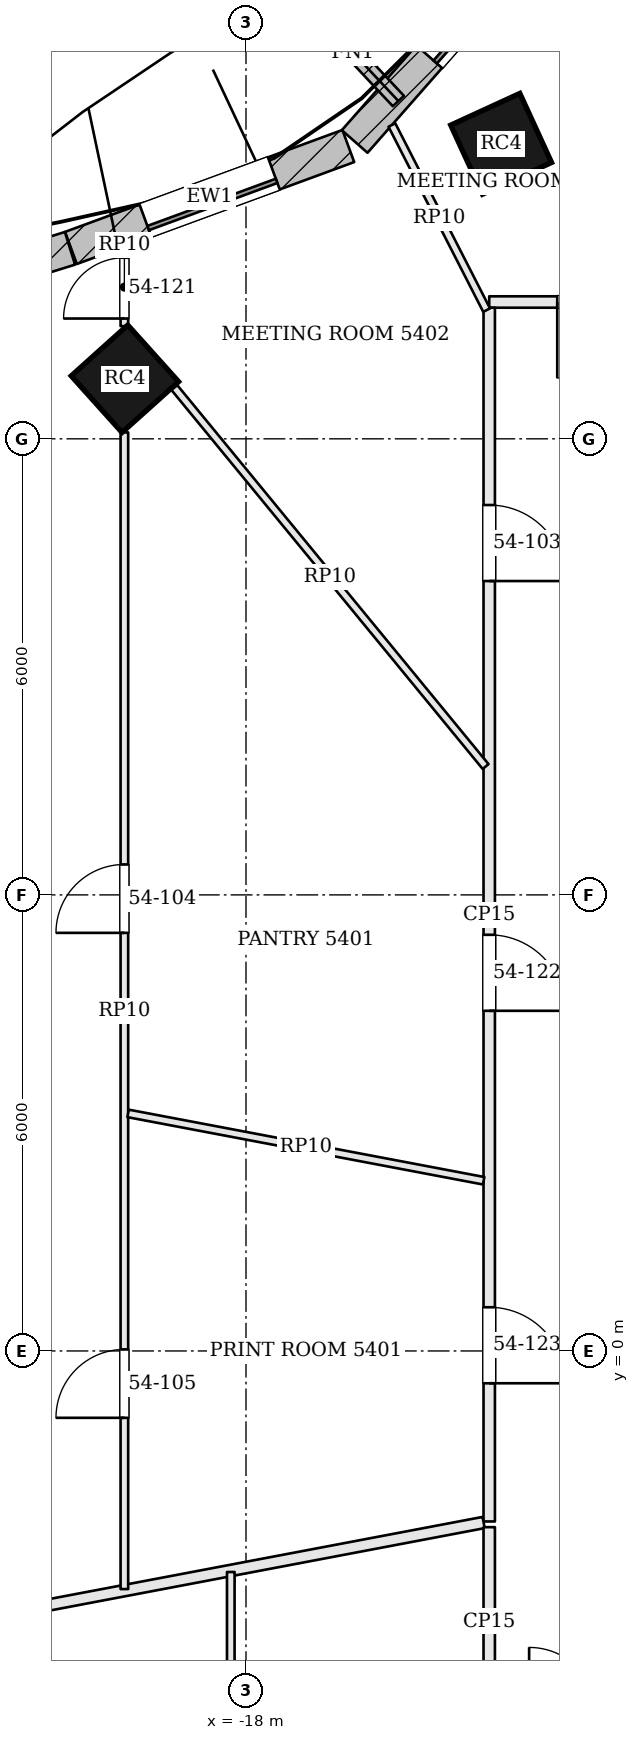
"""IFC4 building model, lengths in metres.
Left out: names, types, materials, properties, quantities, classifications, styles, units other than length and angle.
Written with IfcOpenShell. Run it as: python <this file> out.ifc"""

import sys

from ifc_helpers import new_model, si_unit, direction, frame, frame_2d, origin, origin_2d, place, context, subcontext, project, spatial, rectangle, extrude, element, fill, save


model = new_model("IFC4")
c1 = context("Model", 3, precision=1e-05, world=origin(), true_north=direction((0.0, 1.0)))
c2 = subcontext(c1, "Body", "Model", "MODEL_VIEW")
j1 = project(units=[si_unit("LENGTHUNIT", "METRE"), si_unit("PLANEANGLEUNIT", "RADIAN")], contexts=[c1])
p1 = place(None, origin())
s1 = spatial("IfcSite", under=j1, at=p1, CompositionType="ELEMENT")
p2 = place(p1, origin())
s2 = spatial("IfcBuilding", under=s1, at=p2, CompositionType="ELEMENT")
p3 = place(p2, frame((0.0, 0.0, 221.4)))
s3 = spatial("IfcBuildingStorey", under=s2, at=p3, CompositionType="ELEMENT", Elevation=221.4)
for number, where, z_axis, x_axis in (
    (1, (-14.643, 15.881, 0.0), (0.0, 0.0, 1.0), (-0.909, -0.417, 0.0)),
    (2, (-19.593, 12.79, 0.0), (0.0, 0.0, 1.0), (-0.744, -0.668, 0.0)),
):
    element("IfcColumn", number, at=place(p3, frame(where, z_axis=z_axis, x_axis=x_axis)), inside=s3, PredefinedType="COLUMN", context=c2, shape_type="SweptSolid", body=[
        extrude(rectangle(XDim=1.0, YDim=1.0, at=origin_2d()), origin(), (0.0, 0.0, 1.0), 3.9),
    ])
p4 = place(p3, frame((-13.221, 19.719, 0.0), z_axis=(0.0, 0.0, 1.0), x_axis=(-0.660424908916, -0.750892095899, 0.0)))
e3 = element("IfcWall", 3, at=p4, inside=s3, PredefinedType="SOLIDWALL", context=c2, shape_type="SweptSolid", body=[
    extrude(rectangle(XDim=5.071, YDim=0.45, at=frame_2d((2.535, 0.0))), origin(), (0.0, 0.0, 1.0), 3.7),
])
p5 = place(p4, frame((1.485, 0.0, 0.9)))
e4 = element("IfcOpeningElement", 4, at=p5, cuts=e3, PredefinedType="OPENING", context=c2, shape_type="SweptSolid", body=[
    extrude(rectangle(XDim=2.1, YDim=2.3, at=frame_2d((1.05, 1.15))), frame((0.0, 0.235, 0.0), z_axis=(0.0, -1.0, 0.0), x_axis=(1.0, 0.0, 0.0)), (0.0, 0.0, 1.0), 0.47),
])
p6 = place(p3, frame((-16.654, 15.852, 0.0), z_axis=(0.0, 0.0, 1.0), x_axis=(-0.938636568132, -0.344907803572, 0.0)))
e5 = element("IfcWall", 5, at=p6, inside=s3, PredefinedType="SOLIDWALL", context=c2, shape_type="SweptSolid", body=[
    extrude(rectangle(XDim=3.887, YDim=0.45, at=frame_2d((1.944, 0.0))), origin(), (0.0, 0.0, 1.0), 3.7),
])
p7 = place(p6, frame((1.044, 0.0, 0.9)))
e6 = element("IfcOpeningElement", 6, at=p7, cuts=e5, PredefinedType="OPENING", context=c2, shape_type="SweptSolid", body=[
    extrude(rectangle(XDim=1.8, YDim=2.3, at=frame_2d((0.9, 1.15))), frame((0.0, 0.235, 0.0), z_axis=(0.0, -1.0, 0.0), x_axis=(1.0, 0.0, 0.0)), (0.0, 0.0, 1.0), 0.47),
])
p8 = place(p3, frame((-20.316, 14.507, 0.0), z_axis=(0.0, 0.0, 1.0), x_axis=(-0.954807195185, -0.297225873743, 0.0)))
e7 = element("IfcWall", 7, at=p8, inside=s3, PredefinedType="SOLIDWALL", context=c2, shape_type="SweptSolid", body=[
    extrude(rectangle(XDim=5.526, YDim=0.45, at=frame_2d((2.763, 0.0))), origin(), (0.0, 0.0, 1.0), 3.7),
])
p9 = place(p8, frame((1.713, 0.0, 0.9)))
e8 = element("IfcOpeningElement", 8, at=p9, cuts=e7, PredefinedType="OPENING", context=c2, shape_type="SweptSolid", body=[
    extrude(rectangle(XDim=2.1, YDim=2.3, at=frame_2d((1.05, 1.15))), frame((0.0, 0.235, 0.0), z_axis=(0.0, -1.0, 0.0), x_axis=(1.0, 0.0, 0.0)), (0.0, 0.0, 1.0), 0.47),
])
p10 = place(p3, frame((-15.995, 16.444, 0.0), z_axis=(0.0, 0.0, 1.0), x_axis=(-0.683852936488, 0.729619874494, 0.0)))
e9 = element("IfcWall", 9, at=p10, inside=s3, PredefinedType="SOLIDWALL", context=c2, shape_type="SweptSolid", body=[
    extrude(rectangle(XDim=1.75, YDim=0.2, at=frame_2d((0.875, 0.0))), origin(), (0.0, 0.0, 1.0), 3.7),
])
p11 = place(p3, frame((-6.244, 13.8, 0.0), z_axis=(0.0, 0.0, 1.0), x_axis=(-1.0, 0.0, 0.0)))
e10 = element("IfcWall", 10, at=p11, inside=s3, PredefinedType="PARTITIONING", context=c2, shape_type="SweptSolid", body=[
    extrude(rectangle(XDim=8.556, YDim=0.15, at=frame_2d((4.278, 0.0))), origin(), (0.0, 0.0, 1.0), 3.084),
])
p12 = place(p11, frame((1.897, 0.0, 0.0)))
e11 = element("IfcOpeningElement", 11, at=p12, cuts=e10, PredefinedType="OPENING", context=c2, shape_type="SweptSolid", body=[
    extrude(rectangle(XDim=1.8, YDim=2.1, at=frame_2d((0.9, 1.05))), frame((0.0, 0.085, 0.0), z_axis=(0.0, -1.0, 0.0), x_axis=(1.0, 0.0, 0.0)), (0.0, 0.0, 1.0), 0.17),
])
p13 = place(p11, frame((6.661, 0.0, 0.0)))
e12 = element("IfcOpeningElement", 12, at=p13, cuts=e10, PredefinedType="OPENING", context=c2, shape_type="SweptSolid", body=[
    extrude(rectangle(XDim=1.0, YDim=2.4, at=frame_2d((0.5, 1.2))), frame((0.0, 0.085, 0.0), z_axis=(0.0, -1.0, 0.0), x_axis=(1.0, 0.0, 0.0)), (0.0, 0.0, 1.0), 0.17),
])
p14 = place(p3, frame((-14.8, 13.725, 0.0), z_axis=(0.0, 0.0, 1.0), x_axis=(0.0, -1.0, 0.0)))
e13 = element("IfcWall", 13, at=p14, inside=s3, PredefinedType="PARTITIONING", context=c2, shape_type="SweptSolid", body=[
    extrude(rectangle(XDim=15.968, YDim=0.15, at=frame_2d((7.984, 0.0))), origin(), (0.0, 0.0, 1.0), 3.084),
])
p15 = place(p14, frame((2.596, 0.0, 0.0)))
e14 = element("IfcOpeningElement", 14, at=p15, cuts=e13, PredefinedType="OPENING", context=c2, shape_type="SweptSolid", body=[
    extrude(rectangle(XDim=1.0, YDim=2.4, at=frame_2d((0.5, 1.2))), frame((0.0, 0.085, 0.0), z_axis=(0.0, -1.0, 0.0), x_axis=(1.0, 0.0, 0.0)), (0.0, 0.0, 1.0), 0.17),
])
p16 = place(p14, frame((8.25, 0.0, 0.0)))
e15 = element("IfcOpeningElement", 15, at=p16, cuts=e13, PredefinedType="OPENING", context=c2, shape_type="SweptSolid", body=[
    extrude(rectangle(XDim=1.0, YDim=2.1, at=frame_2d((0.5, 1.05))), frame((0.0, 0.085, 0.0), z_axis=(0.0, -1.0, 0.0), x_axis=(1.0, 0.0, 0.0)), (0.0, 0.0, 1.0), 0.17),
])
p17 = place(p14, frame((13.15, 0.0, 0.0)))
e16 = element("IfcOpeningElement", 16, at=p17, cuts=e13, PredefinedType="OPENING", context=c2, shape_type="SweptSolid", body=[
    extrude(rectangle(XDim=1.0, YDim=2.1, at=frame_2d((0.5, 1.05))), frame((0.0, 0.085, 0.0), z_axis=(0.0, -1.0, 0.0), x_axis=(1.0, 0.0, 0.0)), (0.0, 0.0, 1.0), 0.17),
])
p18 = place(p3, frame((-27.332, -4.618, 0.0), z_axis=(0.0, 0.0, 1.0), x_axis=(0.982506027703, 0.186230785661, 0.0)))
e17 = element("IfcWall", 17, at=p18, inside=s3, PredefinedType="PARTITIONING", context=c2, shape_type="SweptSolid", body=[
    extrude(rectangle(XDim=12.68, YDim=0.15, at=frame_2d((6.34, 0.0))), origin(), (0.0, 0.0, 1.0), 3.234),
])
p19 = place(p3, frame((-14.8, -2.318, 0.0), z_axis=(0.0, 0.0, 1.0), x_axis=(0.0, -1.0, 0.0)))
e18 = element("IfcWall", 18, at=p19, inside=s3, PredefinedType="PARTITIONING", context=c2, shape_type="SweptSolid", body=[
    extrude(rectangle(XDim=2.482, YDim=0.15, at=frame_2d((1.241, 0.0))), origin(), (0.0, 0.0, 1.0), 3.084),
])
p20 = place(p3, frame((-19.6, -3.133, 0.0), z_axis=(0.0, 0.0, 1.0), x_axis=(0.0, 1.0, 0.0)))
e19 = element("IfcWall", 19, at=p20, inside=s3, PredefinedType="PARTITIONING", context=c2, shape_type="SweptSolid", body=[
    extrude(rectangle(XDim=15.217, YDim=0.1, at=frame_2d((7.609, 0.0))), origin(), (0.0, 0.0, 1.0), 3.084),
])
p21 = place(p20, frame((8.633, 0.0, 0.0)))
e20 = element("IfcOpeningElement", 20, at=p21, cuts=e19, PredefinedType="OPENING", context=c2, shape_type="SweptSolid", body=[
    extrude(rectangle(XDim=0.9, YDim=2.1, at=frame_2d((0.45, 1.05))), frame((0.0, 0.06, 0.0), z_axis=(0.0, -1.0, 0.0), x_axis=(1.0, 0.0, 0.0)), (0.0, 0.0, 1.0), 0.12),
])
p22 = place(p20, frame((2.253, 0.0, 0.0)))
e21 = element("IfcOpeningElement", 21, at=p22, cuts=e19, PredefinedType="OPENING", context=c2, shape_type="SweptSolid", body=[
    extrude(rectangle(XDim=0.9, YDim=2.1, at=frame_2d((0.45, 1.05))), frame((0.0, 0.06, 0.0), z_axis=(0.0, -1.0, 0.0), x_axis=(1.0, 0.0, 0.0)), (0.0, 0.0, 1.0), 0.12),
])
p23 = place(p3, frame((-19.6, 13.483, 0.0), z_axis=(0.0, 0.0, 1.0), x_axis=(0.0, 1.0, 0.0)))
e22 = element("IfcWall", 22, at=p23, inside=s3, PredefinedType="PARTITIONING", context=c2, shape_type="SweptSolid", body=[
    extrude(rectangle(XDim=1.026, YDim=0.1, at=frame_2d((0.513, 0.0))), origin(), (0.0, 0.0, 1.0), 3.084),
])
p24 = place(p23, frame((0.1, 0.0, 0.0)))
e23 = element("IfcOpeningElement", 23, at=p24, cuts=e22, PredefinedType="OPENING", context=c2, shape_type="SweptSolid", body=[
    extrude(rectangle(XDim=0.8, YDim=2.1, at=frame_2d((0.4, 1.05))), frame((0.0, 0.06, 0.0), z_axis=(0.0, -1.0, 0.0), x_axis=(1.0, 0.0, 0.0)), (0.0, 0.0, 1.0), 0.12),
])
p25 = place(p3, frame((-14.834, 13.693, 0.0), z_axis=(0.0, 0.0, 1.0), x_axis=(-0.455511992018, 0.89022964741, 0.0)))
e24 = element("IfcWall", 24, at=p25, inside=s3, PredefinedType="PARTITIONING", context=c2, shape_type="SweptSolid", body=[
    extrude(rectangle(XDim=2.736, YDim=0.1, at=frame_2d((1.368, 0.0))), origin(), (0.0, 0.0, 1.0), 3.084),
])
p26 = place(p3, frame((-14.848, 7.689, 0.0), z_axis=(0.0, 0.0, 1.0), x_axis=(-0.63471602348, 0.772745475262, 0.0)))
e25 = element("IfcWall", 25, at=p26, inside=s3, PredefinedType="PARTITIONING", context=c2, shape_type="SweptSolid", body=[
    extrude(rectangle(XDim=6.452, YDim=0.1, at=frame_2d((3.226, 0.0))), origin(), (0.0, 0.0, 1.0), 3.084),
])
p27 = place(p3, frame((-14.874, 2.239, 0.0), z_axis=(0.0, 0.0, 1.0), x_axis=(-0.982526163868, 0.186124520994, 0.0)))
e26 = element("IfcWall", 26, at=p27, inside=s3, PredefinedType="PARTITIONING", context=c2, shape_type="SweptSolid", body=[
    extrude(rectangle(XDim=4.76, YDim=0.1, at=frame_2d((2.38, 0.0))), origin(), (0.0, 0.0, 1.0), 3.084),
])
p28 = place(p3, frame((-18.2, -8.2, 0.0), z_axis=(0.0, 0.0, 1.0), x_axis=(0.0, 1.0, 0.0)))
e27 = element("IfcWall", 27, at=p28, inside=s3, PredefinedType="PARTITIONING", context=c2, shape_type="SweptSolid", body=[
    extrude(rectangle(XDim=5.292, YDim=0.1, at=frame_2d((2.646, 0.0))), origin(), (0.0, 0.0, 1.0), 3.084),
])
p29 = place(p5, origin())
e28 = element("IfcWindow", 28, at=p29, inside=s3, PartitioningType="SINGLE_PANEL", PredefinedType="WINDOW", context=c2, shape_type="SweptSolid", body=[
    extrude(rectangle(XDim=2.1, YDim=2.3, at=frame_2d((1.05, 1.15))), frame((0.0, 0.135, 0.0), z_axis=(0.0, -1.0, 0.0), x_axis=(1.0, 0.0, 0.0)), (0.0, 0.0, 1.0), 0.06),
])
fill(e4, e28)
p30 = place(p7, origin())
e29 = element("IfcWindow", 29, at=p30, inside=s3, PartitioningType="SINGLE_PANEL", PredefinedType="WINDOW", context=c2, shape_type="SweptSolid", body=[
    extrude(rectangle(XDim=1.8, YDim=2.3, at=frame_2d((0.9, 1.15))), frame((0.0, 0.135, 0.0), z_axis=(0.0, -1.0, 0.0), x_axis=(1.0, 0.0, 0.0)), (0.0, 0.0, 1.0), 0.06),
])
fill(e6, e29)
p31 = place(p13, origin())
e30 = element("IfcDoor", 30, at=p31, inside=s3, OperationType="SINGLE_SWING_RIGHT", PredefinedType="DOOR", context=c2, shape_type="SweptSolid", body=[
    extrude(rectangle(XDim=1.0, YDim=2.4, at=frame_2d((0.5, 1.2))), frame((0.0, 0.025, 0.0), z_axis=(0.0, -1.0, 0.0), x_axis=(1.0, 0.0, 0.0)), (0.0, 0.0, 1.0), 0.05),
])
fill(e12, e30)
p32 = place(p15, origin())
e31 = element("IfcDoor", 31, at=p32, inside=s3, OperationType="SINGLE_SWING_RIGHT", PredefinedType="DOOR", context=c2, shape_type="SweptSolid", body=[
    extrude(rectangle(XDim=1.0, YDim=2.4, at=frame_2d((0.5, 1.2))), frame((0.0, 0.025, 0.0), z_axis=(0.0, -1.0, 0.0), x_axis=(1.0, 0.0, 0.0)), (0.0, 0.0, 1.0), 0.05),
])
fill(e14, e31)
p33 = place(p21, origin())
e32 = element("IfcDoor", 32, at=p33, inside=s3, OperationType="SINGLE_SWING_LEFT", PredefinedType="DOOR", context=c2, shape_type="SweptSolid", body=[
    extrude(rectangle(XDim=0.9, YDim=2.1, at=frame_2d((0.45, 1.05))), frame((0.0, 0.025, 0.0), z_axis=(0.0, -1.0, 0.0), x_axis=(1.0, 0.0, 0.0)), (0.0, 0.0, 1.0), 0.05),
])
fill(e20, e32)
p34 = place(p22, origin())
e33 = element("IfcDoor", 33, at=p34, inside=s3, OperationType="SINGLE_SWING_LEFT", PredefinedType="DOOR", context=c2, shape_type="SweptSolid", body=[
    extrude(rectangle(XDim=0.9, YDim=2.1, at=frame_2d((0.45, 1.05))), frame((0.0, 0.025, 0.0), z_axis=(0.0, -1.0, 0.0), x_axis=(1.0, 0.0, 0.0)), (0.0, 0.0, 1.0), 0.05),
])
fill(e21, e33)
p35 = place(p24, origin())
e34 = element("IfcDoor", 34, at=p35, inside=s3, OperationType="SINGLE_SWING_LEFT", PredefinedType="DOOR", context=c2, shape_type="SweptSolid", body=[
    extrude(rectangle(XDim=0.8, YDim=2.1, at=frame_2d((0.4, 1.05))), frame((0.0, 0.025, 0.0), z_axis=(0.0, -1.0, 0.0), x_axis=(1.0, 0.0, 0.0)), (0.0, 0.0, 1.0), 0.05),
])
fill(e23, e34)
p36 = place(p16, origin())
e35 = element("IfcDoor", 35, at=p36, inside=s3, OperationType="SINGLE_SWING_RIGHT", PredefinedType="DOOR", context=c2, shape_type="SweptSolid", body=[
    extrude(rectangle(XDim=1.0, YDim=2.1, at=frame_2d((0.5, 1.05))), frame((0.0, 0.025, 0.0), z_axis=(0.0, -1.0, 0.0), x_axis=(1.0, 0.0, 0.0)), (0.0, 0.0, 1.0), 0.05),
])
fill(e15, e35)
p37 = place(p17, origin())
e36 = element("IfcDoor", 36, at=p37, inside=s3, OperationType="SINGLE_SWING_RIGHT", PredefinedType="DOOR", context=c2, shape_type="SweptSolid", body=[
    extrude(rectangle(XDim=1.0, YDim=2.1, at=frame_2d((0.5, 1.05))), frame((0.0, 0.025, 0.0), z_axis=(0.0, -1.0, 0.0), x_axis=(1.0, 0.0, 0.0)), (0.0, 0.0, 1.0), 0.05),
])
fill(e16, e36)
save(model, sys.argv[1])
